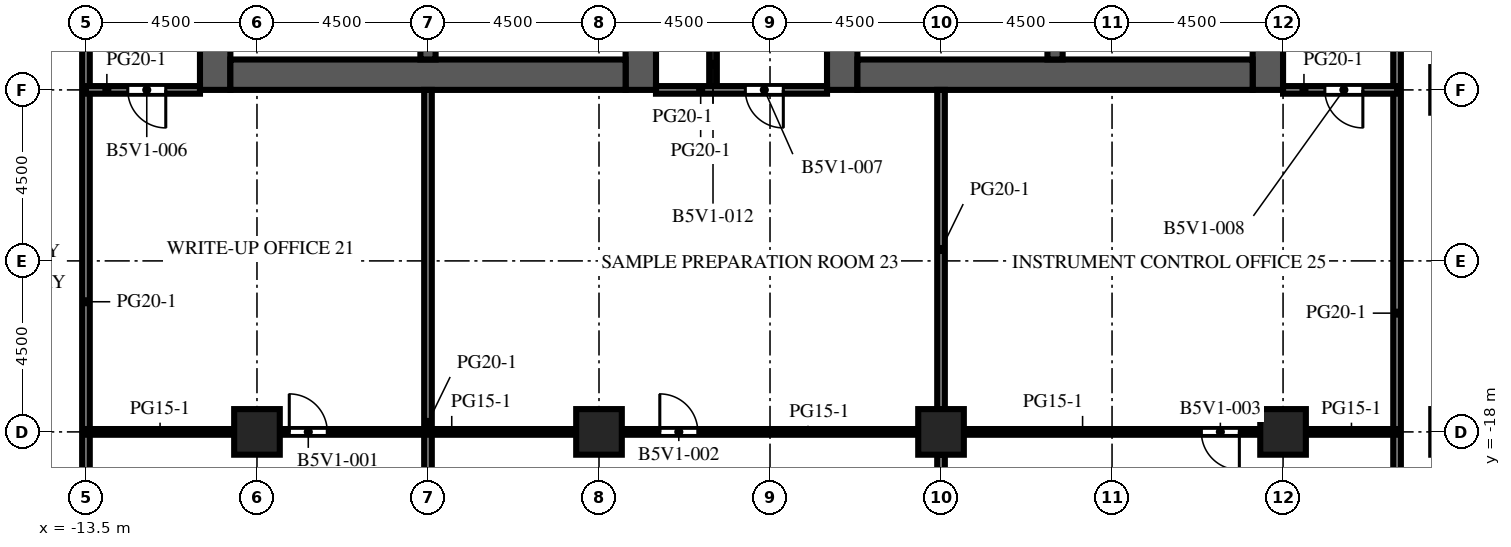
"""IFC4 building model, lengths in metres.
Left out: names, types, materials, properties, quantities, classifications, styles, units other than length and angle.
Written with IfcOpenShell. Run it as: python <this file> out.ifc"""

import sys

from ifc_helpers import new_model, si_unit, direction, frame, frame_2d, origin, origin_2d, place, context, subcontext, project, spatial, rectangle, extrude, element, fill, save


model = new_model("IFC4")
c1 = context("Model", 3, precision=1e-05, world=origin(), true_north=direction((0.0, 1.0)))
c2 = subcontext(c1, "Body", "Model", "MODEL_VIEW")
j1 = project(units=[si_unit("LENGTHUNIT", "METRE"), si_unit("PLANEANGLEUNIT", "RADIAN")], contexts=[c1])
p1 = place(None, origin())
s1 = spatial("IfcSite", under=j1, at=p1, CompositionType="ELEMENT")
p2 = place(p1, origin())
s2 = spatial("IfcBuilding", under=s1, at=p2, CompositionType="ELEMENT")
p3 = place(p2, frame((0.0, 0.0, 165.0)))
s3 = spatial("IfcBuildingStorey", under=s2, at=p3, CompositionType="ELEMENT", Elevation=165.0)
for number, where, z_axis, x_axis in (
    (1, (-9.0, -18.0, 0.0), (0.0, 0.0, 1.0), (1.0, 0.0, 0.0)),
    (2, (0.0, -18.0, 0.0), (0.0, 0.0, 1.0), (1.0, 0.0, 0.0)),
    (3, (9.0, -18.0, 0.0), (0.0, 0.0, 1.0), (1.0, 0.0, 0.0)),
    (4, (18.0, -18.0, 0.0), (0.0, 0.0, 1.0), (1.0, 0.0, 0.0)),
):
    element("IfcColumn", number, at=place(p3, frame(where, z_axis=z_axis, x_axis=x_axis)), inside=s3, PredefinedType="COLUMN", context=c2, shape_type="SweptSolid", body=[
        extrude(rectangle(XDim=1.2, YDim=1.2, at=origin_2d()), origin(), (0.0, 0.0, 1.0), 4.1),
    ])
p4 = place(p3, frame((-10.1, -9.0, 0.0), z_axis=(0.0, 0.0, 1.0), x_axis=(0.0, 1.0, 0.0)))
e5 = element("IfcWall", 5, at=p4, inside=s3, PredefinedType="SHEAR", context=c2, shape_type="SweptSolid", body=[
    extrude(rectangle(XDim=27.5, YDim=0.8, at=frame_2d((13.75, 0.0))), origin(), (0.0, 0.0, 1.0), 4.1),
])
p5 = place(p4, frame((12.55, 0.0, 0.0)))
e6 = element("IfcOpeningElement", 6, at=p5, cuts=e5, PredefinedType="OPENING", context=c2, shape_type="SweptSolid", body=[
    extrude(rectangle(XDim=2.4, YDim=2.4, at=frame_2d((1.2, 1.2))), frame((0.0, 0.41, 0.0), z_axis=(0.0, -1.0, 0.0), x_axis=(1.0, 0.0, 0.0)), (0.0, 0.0, 1.0), 0.82),
])
p6 = place(p4, frame((6.825, 0.0, 0.0)))
e7 = element("IfcOpeningElement", 7, at=p6, cuts=e5, PredefinedType="OPENING", context=c2, shape_type="SweptSolid", body=[
    extrude(rectangle(XDim=1.2, YDim=2.1, at=frame_2d((0.6, 1.05))), frame((0.0, 0.41, 0.0), z_axis=(0.0, -1.0, 0.0), x_axis=(1.0, 0.0, 0.0)), (0.0, 0.0, 1.0), 0.82),
])
p7 = place(p4, frame((19.475, 0.0, 0.0)))
e8 = element("IfcOpeningElement", 8, at=p7, cuts=e5, PredefinedType="OPENING", context=c2, shape_type="SweptSolid", body=[
    extrude(rectangle(XDim=1.2, YDim=2.1, at=frame_2d((0.6, 1.05))), frame((0.0, 0.41, 0.0), z_axis=(0.0, -1.0, 0.0), x_axis=(1.0, 0.0, 0.0)), (0.0, 0.0, 1.0), 0.82),
])
p8 = place(p3, frame((1.1, -9.0, 0.0), z_axis=(0.0, 0.0, 1.0), x_axis=(0.0, 1.0, 0.0)))
e9 = element("IfcWall", 9, at=p8, inside=s3, PredefinedType="SHEAR", context=c2, shape_type="SweptSolid", body=[
    extrude(rectangle(XDim=27.5, YDim=0.8, at=frame_2d((13.75, 0.0))), origin(), (0.0, 0.0, 1.0), 4.1),
])
p9 = place(p8, frame((12.55, 0.0, 0.0)))
e10 = element("IfcOpeningElement", 10, at=p9, cuts=e9, PredefinedType="OPENING", context=c2, shape_type="SweptSolid", body=[
    extrude(rectangle(XDim=2.4, YDim=2.4, at=frame_2d((1.2, 1.2))), frame((0.0, 0.41, 0.0), z_axis=(0.0, -1.0, 0.0), x_axis=(1.0, 0.0, 0.0)), (0.0, 0.0, 1.0), 0.82),
])
p10 = place(p8, frame((3.95, 0.0, 0.0)))
e11 = element("IfcOpeningElement", 11, at=p10, cuts=e9, PredefinedType="OPENING", context=c2, shape_type="SweptSolid", body=[
    extrude(rectangle(XDim=1.2, YDim=2.1, at=frame_2d((0.6, 1.05))), frame((0.0, 0.41, 0.0), z_axis=(0.0, -1.0, 0.0), x_axis=(1.0, 0.0, 0.0)), (0.0, 0.0, 1.0), 0.82),
])
p11 = place(p8, frame((22.35, 0.0, 0.0)))
e12 = element("IfcOpeningElement", 12, at=p11, cuts=e9, PredefinedType="OPENING", context=c2, shape_type="SweptSolid", body=[
    extrude(rectangle(XDim=1.2, YDim=2.1, at=frame_2d((0.6, 1.05))), frame((0.0, 0.41, 0.0), z_axis=(0.0, -1.0, 0.0), x_axis=(1.0, 0.0, 0.0)), (0.0, 0.0, 1.0), 0.82),
])
p12 = place(p3, frame((-9.7, -8.6, 0.0), z_axis=(0.0, 0.0, 1.0), x_axis=(1.0, 0.0, 0.0)))
e13 = element("IfcWall", 13, at=p12, inside=s3, PredefinedType="SHEAR", context=c2, shape_type="SweptSolid", body=[
    extrude(rectangle(XDim=10.4, YDim=0.8, at=frame_2d((5.2, 0.0))), origin(), (0.0, 0.0, 1.0), 4.1),
])
p13 = place(p3, frame((-4.5, -8.2, 0.0), z_axis=(0.0, 0.0, 1.0), x_axis=(0.0, 1.0, 0.0)))
e14 = element("IfcWall", 14, at=p13, inside=s3, PredefinedType="SHEAR", context=c2, shape_type="SweptSolid", body=[
    extrude(rectangle(XDim=7.5, YDim=0.4, at=frame_2d((3.75, 0.0))), origin(), (0.0, 0.0, 1.0), 4.1),
])
p14 = place(p3, frame((6.4, -9.0, 0.0), z_axis=(0.0, 0.0, 1.0), x_axis=(0.0, 1.0, 0.0)))
e15 = element("IfcWall", 15, at=p14, inside=s3, PredefinedType="SHEAR", context=c2, shape_type="SweptSolid", body=[
    extrude(rectangle(XDim=27.5, YDim=0.8, at=frame_2d((13.75, 0.0))), origin(), (0.0, 0.0, 1.0), 4.1),
])
p15 = place(p14, frame((12.55, 0.0, 0.0)))
e16 = element("IfcOpeningElement", 16, at=p15, cuts=e15, PredefinedType="OPENING", context=c2, shape_type="SweptSolid", body=[
    extrude(rectangle(XDim=2.4, YDim=2.4, at=frame_2d((1.2, 1.2))), frame((0.0, 0.41, 0.0), z_axis=(0.0, -1.0, 0.0), x_axis=(1.0, 0.0, 0.0)), (0.0, 0.0, 1.0), 0.82),
])
p16 = place(p14, frame((3.95, 0.0, 0.0)))
e17 = element("IfcOpeningElement", 17, at=p16, cuts=e15, PredefinedType="OPENING", context=c2, shape_type="SweptSolid", body=[
    extrude(rectangle(XDim=1.2, YDim=2.1, at=frame_2d((0.6, 1.05))), frame((0.0, 0.41, 0.0), z_axis=(0.0, -1.0, 0.0), x_axis=(1.0, 0.0, 0.0)), (0.0, 0.0, 1.0), 0.82),
])
p17 = place(p14, frame((22.35, 0.0, 0.0)))
e18 = element("IfcOpeningElement", 18, at=p17, cuts=e15, PredefinedType="OPENING", context=c2, shape_type="SweptSolid", body=[
    extrude(rectangle(XDim=1.2, YDim=2.1, at=frame_2d((0.6, 1.05))), frame((0.0, 0.41, 0.0), z_axis=(0.0, -1.0, 0.0), x_axis=(1.0, 0.0, 0.0)), (0.0, 0.0, 1.0), 0.82),
])
p18 = place(p3, frame((17.6, -9.0, 0.0), z_axis=(0.0, 0.0, 1.0), x_axis=(0.0, 1.0, 0.0)))
e19 = element("IfcWall", 19, at=p18, inside=s3, PredefinedType="SHEAR", context=c2, shape_type="SweptSolid", body=[
    extrude(rectangle(XDim=27.5, YDim=0.8, at=frame_2d((13.75, 0.0))), origin(), (0.0, 0.0, 1.0), 4.1),
])
p19 = place(p18, frame((12.55, 0.0, 0.0)))
e20 = element("IfcOpeningElement", 20, at=p19, cuts=e19, PredefinedType="OPENING", context=c2, shape_type="SweptSolid", body=[
    extrude(rectangle(XDim=2.4, YDim=2.4, at=frame_2d((1.2, 1.2))), frame((0.0, 0.41, 0.0), z_axis=(0.0, -1.0, 0.0), x_axis=(1.0, 0.0, 0.0)), (0.0, 0.0, 1.0), 0.82),
])
p20 = place(p18, frame((6.825, 0.0, 0.0)))
e21 = element("IfcOpeningElement", 21, at=p20, cuts=e19, PredefinedType="OPENING", context=c2, shape_type="SweptSolid", body=[
    extrude(rectangle(XDim=1.2, YDim=2.1, at=frame_2d((0.6, 1.05))), frame((0.0, 0.41, 0.0), z_axis=(0.0, -1.0, 0.0), x_axis=(1.0, 0.0, 0.0)), (0.0, 0.0, 1.0), 0.82),
])
p21 = place(p18, frame((19.475, 0.0, 0.0)))
e22 = element("IfcOpeningElement", 22, at=p21, cuts=e19, PredefinedType="OPENING", context=c2, shape_type="SweptSolid", body=[
    extrude(rectangle(XDim=1.2, YDim=2.1, at=frame_2d((0.6, 1.05))), frame((0.0, 0.41, 0.0), z_axis=(0.0, -1.0, 0.0), x_axis=(1.0, 0.0, 0.0)), (0.0, 0.0, 1.0), 0.82),
])
p22 = place(p3, frame((6.8, -8.6, 0.0), z_axis=(0.0, 0.0, 1.0), x_axis=(1.0, 0.0, 0.0)))
e23 = element("IfcWall", 23, at=p22, inside=s3, PredefinedType="SHEAR", context=c2, shape_type="SweptSolid", body=[
    extrude(rectangle(XDim=10.4, YDim=0.8, at=frame_2d((5.2, 0.0))), origin(), (0.0, 0.0, 1.0), 4.1),
])
p23 = place(p3, frame((12.0, -8.2, 0.0), z_axis=(0.0, 0.0, 1.0), x_axis=(0.0, 1.0, 0.0)))
e24 = element("IfcWall", 24, at=p23, inside=s3, PredefinedType="SHEAR", context=c2, shape_type="SweptSolid", body=[
    extrude(rectangle(XDim=7.5, YDim=0.4, at=frame_2d((3.75, 0.0))), origin(), (0.0, 0.0, 1.0), 4.1),
])
p24 = place(p3, frame((-0.8, -8.2, 0.0), z_axis=(0.0, 0.0, 1.0), x_axis=(0.0, 1.0, 0.0)))
e25 = element("IfcWall", 25, at=p24, inside=s3, PredefinedType="PARTITIONING", context=c2, shape_type="SweptSolid", body=[
    extrude(rectangle(XDim=2.55, YDim=0.1, at=frame_2d((1.275, 0.0))), origin(), (0.0, 0.0, 1.0), 3.65),
])
p25 = place(p24, frame((0.775, 0.0, 0.0)))
e26 = element("IfcOpeningElement", 26, at=p25, cuts=e25, PredefinedType="OPENING", context=c2, shape_type="SweptSolid", body=[
    extrude(rectangle(XDim=1.0, YDim=2.1, at=frame_2d((0.5, 1.05))), frame((0.0, 0.06, 0.0), z_axis=(0.0, -1.0, 0.0), x_axis=(1.0, 0.0, 0.0)), (0.0, 0.0, 1.0), 0.12),
])
p26 = place(p3, frame((8.3, -8.2, 0.0), z_axis=(0.0, 0.0, 1.0), x_axis=(0.0, 1.0, 0.0)))
e27 = element("IfcWall", 27, at=p26, inside=s3, PredefinedType="PARTITIONING", context=c2, shape_type="SweptSolid", body=[
    extrude(rectangle(XDim=2.55, YDim=0.1, at=frame_2d((1.275, 0.0))), origin(), (0.0, 0.0, 1.0), 3.65),
])
p27 = place(p26, frame((0.775, 0.0, 0.0)))
e28 = element("IfcOpeningElement", 28, at=p27, cuts=e27, PredefinedType="OPENING", context=c2, shape_type="SweptSolid", body=[
    extrude(rectangle(XDim=1.0, YDim=2.1, at=frame_2d((0.5, 1.05))), frame((0.0, 0.06, 0.0), z_axis=(0.0, -1.0, 0.0), x_axis=(1.0, 0.0, 0.0)), (0.0, 0.0, 1.0), 0.12),
])
p28 = place(p3, frame((-13.5, -26.5, 0.0), z_axis=(0.0, 0.0, 1.0), x_axis=(0.0, 1.0, 0.0)))
e29 = element("IfcWall", 29, at=p28, inside=s3, PredefinedType="PARTITIONING", context=c2, shape_type="SweptSolid", body=[
    extrude(rectangle(XDim=29.75, YDim=0.2, at=frame_2d((14.875, 0.0))), origin(), (0.0, 0.0, 1.0), 3.65),
])
p29 = place(p28, frame((23.85, 0.0, 0.0)))
e30 = element("IfcOpeningElement", 30, at=p29, cuts=e29, PredefinedType="OPENING", context=c2, shape_type="SweptSolid", body=[
    extrude(rectangle(XDim=1.0, YDim=2.1, at=frame_2d((0.5, 1.05))), frame((0.0, 0.11, 0.0), z_axis=(0.0, -1.0, 0.0), x_axis=(1.0, 0.0, 0.0)), (0.0, 0.0, 1.0), 0.22),
])
p30 = place(p3, frame((-4.5, -26.5, 0.0), z_axis=(0.0, 0.0, 1.0), x_axis=(0.0, 1.0, 0.0)))
e31 = element("IfcWall", 31, at=p30, inside=s3, PredefinedType="PARTITIONING", context=c2, shape_type="SweptSolid", body=[
    extrude(rectangle(XDim=17.5, YDim=0.2, at=frame_2d((8.75, 0.0))), origin(), (0.0, 0.0, 1.0), 3.65),
])
p31 = place(p3, frame((3.0, -9.0, 0.0), z_axis=(0.0, 0.0, 1.0), x_axis=(0.0, 1.0, 0.0)))
e32 = element("IfcWall", 32, at=p31, inside=s3, PredefinedType="PARTITIONING", context=c2, shape_type="SweptSolid", body=[
    extrude(rectangle(XDim=3.0, YDim=0.2, at=frame_2d((1.5, 0.0))), origin(), (0.0, 0.0, 1.0), 3.65),
])
p32 = place(p31, frame((1.35, 0.0, 0.0)))
e33 = element("IfcOpeningElement", 33, at=p32, cuts=e32, PredefinedType="OPENING", context=c2, shape_type="SweptSolid", body=[
    extrude(rectangle(XDim=1.0, YDim=2.1, at=frame_2d((0.5, 1.05))), frame((0.0, 0.11, 0.0), z_axis=(0.0, -1.0, 0.0), x_axis=(1.0, 0.0, 0.0)), (0.0, 0.0, 1.0), 0.22),
])
p33 = place(p3, frame((9.0, -26.5, 0.0), z_axis=(0.0, 0.0, 1.0), x_axis=(0.0, 1.0, 0.0)))
e34 = element("IfcWall", 34, at=p33, inside=s3, PredefinedType="PARTITIONING", context=c2, shape_type="SweptSolid", body=[
    extrude(rectangle(XDim=7.9, YDim=0.2, at=frame_2d((3.95, 0.0))), origin(), (0.0, 0.0, 1.0), 3.65),
])
p34 = place(p3, frame((9.0, -17.4, 0.0), z_axis=(0.0, 0.0, 1.0), x_axis=(0.0, 1.0, 0.0)))
e35 = element("IfcWall", 35, at=p34, inside=s3, PredefinedType="PARTITIONING", context=c2, shape_type="SweptSolid", body=[
    extrude(rectangle(XDim=8.4, YDim=0.2, at=frame_2d((4.2, 0.0))), origin(), (0.0, 0.0, 1.0), 3.65),
])
p35 = place(p3, frame((21.0, 3.25, 0.0), z_axis=(0.0, 0.0, 1.0), x_axis=(0.0, -1.0, 0.0)))
e36 = element("IfcWall", 36, at=p35, inside=s3, PredefinedType="PARTITIONING", context=c2, shape_type="SweptSolid", body=[
    extrude(rectangle(XDim=30.1, YDim=0.2, at=frame_2d((15.05, 0.0))), origin(), (0.0, 0.0, 1.0), 3.65),
])
p36 = place(p35, frame((5.15, 0.0, 0.0)))
e37 = element("IfcOpeningElement", 37, at=p36, cuts=e36, PredefinedType="OPENING", context=c2, shape_type="SweptSolid", body=[
    extrude(rectangle(XDim=1.0, YDim=2.1, at=frame_2d((0.5, 1.05))), frame((0.0, 0.11, 0.0), z_axis=(0.0, -1.0, 0.0), x_axis=(1.0, 0.0, 0.0)), (0.0, 0.0, 1.0), 0.22),
])
p37 = place(p3, frame((-13.5, -18.0, 0.0), z_axis=(0.0, 0.0, 1.0), x_axis=(1.0, 0.0, 0.0)))
e38 = element("IfcWall", 38, at=p37, inside=s3, PredefinedType="PARTITIONING", context=c2, shape_type="SweptSolid", body=[
    extrude(rectangle(XDim=3.9, YDim=0.15, at=frame_2d((1.95, 0.0))), origin(), (0.0, 0.0, 1.0), 3.65),
])
p38 = place(p3, frame((-0.6, -18.0, 0.0), z_axis=(0.0, 0.0, 1.0), x_axis=(-1.0, 0.0, 0.0)))
e39 = element("IfcWall", 39, at=p38, inside=s3, PredefinedType="PARTITIONING", context=c2, shape_type="SweptSolid", body=[
    extrude(rectangle(XDim=7.8, YDim=0.15, at=frame_2d((3.9, 0.0))), origin(), (0.0, 0.0, 1.0), 3.65),
])
p39 = place(p38, frame((6.55, 0.0, 0.0)))
e40 = element("IfcOpeningElement", 40, at=p39, cuts=e39, PredefinedType="OPENING", context=c2, shape_type="SweptSolid", body=[
    extrude(rectangle(XDim=1.0, YDim=2.1, at=frame_2d((0.5, 1.05))), frame((0.0, 0.085, 0.0), z_axis=(0.0, -1.0, 0.0), x_axis=(1.0, 0.0, 0.0)), (0.0, 0.0, 1.0), 0.17),
])
p40 = place(p3, frame((8.4, -18.0, 0.0), z_axis=(0.0, 0.0, 1.0), x_axis=(-1.0, 0.0, 0.0)))
e41 = element("IfcWall", 41, at=p40, inside=s3, PredefinedType="PARTITIONING", context=c2, shape_type="SweptSolid", body=[
    extrude(rectangle(XDim=7.8, YDim=0.15, at=frame_2d((3.9, 0.0))), origin(), (0.0, 0.0, 1.0), 3.65),
])
p41 = place(p40, frame((5.8, 0.0, 0.0)))
e42 = element("IfcOpeningElement", 42, at=p41, cuts=e41, PredefinedType="OPENING", context=c2, shape_type="SweptSolid", body=[
    extrude(rectangle(XDim=1.0, YDim=2.1, at=frame_2d((0.5, 1.05))), frame((0.0, 0.085, 0.0), z_axis=(0.0, -1.0, 0.0), x_axis=(1.0, 0.0, 0.0)), (0.0, 0.0, 1.0), 0.17),
])
p42 = place(p3, frame((17.4, -18.0, 0.0), z_axis=(0.0, 0.0, 1.0), x_axis=(-1.0, 0.0, 0.0)))
e43 = element("IfcWall", 43, at=p42, inside=s3, PredefinedType="PARTITIONING", context=c2, shape_type="SweptSolid", body=[
    extrude(rectangle(XDim=7.8, YDim=0.15, at=frame_2d((3.9, 0.0))), origin(), (0.0, 0.0, 1.0), 3.65),
])
p43 = place(p42, frame((0.55, 0.0, 0.0)))
e44 = element("IfcOpeningElement", 44, at=p43, cuts=e43, PredefinedType="OPENING", context=c2, shape_type="SweptSolid", body=[
    extrude(rectangle(XDim=1.0, YDim=2.1, at=frame_2d((0.5, 1.05))), frame((0.0, 0.085, 0.0), z_axis=(0.0, -1.0, 0.0), x_axis=(1.0, 0.0, 0.0)), (0.0, 0.0, 1.0), 0.17),
])
p44 = place(p3, frame((18.6, -18.0, 0.0), z_axis=(0.0, 0.0, 1.0), x_axis=(1.0, 0.0, 0.0)))
e45 = element("IfcWall", 45, at=p44, inside=s3, PredefinedType="PARTITIONING", context=c2, shape_type="SweptSolid", body=[
    extrude(rectangle(XDim=2.4, YDim=0.15, at=frame_2d((1.2, 0.0))), origin(), (0.0, 0.0, 1.0), 3.65),
])
p45 = place(p3, frame((-10.5, -9.0, 0.0), z_axis=(0.0, 0.0, 1.0), x_axis=(-1.0, 0.0, 0.0)))
e46 = element("IfcWall", 46, at=p45, inside=s3, PredefinedType="PARTITIONING", context=c2, shape_type="SweptSolid", body=[
    extrude(rectangle(XDim=3.0, YDim=0.2, at=frame_2d((1.5, 0.0))), origin(), (0.0, 0.0, 1.0), 3.65),
])
p46 = place(p45, frame((0.9, 0.0, 0.0)))
e47 = element("IfcOpeningElement", 47, at=p46, cuts=e46, PredefinedType="OPENING", context=c2, shape_type="SweptSolid", body=[
    extrude(rectangle(XDim=1.0, YDim=2.1, at=frame_2d((0.5, 1.05))), frame((0.0, 0.11, 0.0), z_axis=(0.0, -1.0, 0.0), x_axis=(1.0, 0.0, 0.0)), (0.0, 0.0, 1.0), 0.22),
])
p47 = place(p3, frame((6.0, -9.0, 0.0), z_axis=(0.0, 0.0, 1.0), x_axis=(-1.0, 0.0, 0.0)))
e48 = element("IfcWall", 48, at=p47, inside=s3, PredefinedType="PARTITIONING", context=c2, shape_type="SweptSolid", body=[
    extrude(rectangle(XDim=4.5, YDim=0.2, at=frame_2d((2.25, 0.0))), origin(), (0.0, 0.0, 1.0), 3.65),
])
p48 = place(p47, frame((1.15, 0.0, 0.0)))
e49 = element("IfcOpeningElement", 49, at=p48, cuts=e48, PredefinedType="OPENING", context=c2, shape_type="SweptSolid", body=[
    extrude(rectangle(XDim=1.0, YDim=2.1, at=frame_2d((0.5, 1.05))), frame((0.0, 0.11, 0.0), z_axis=(0.0, -1.0, 0.0), x_axis=(1.0, 0.0, 0.0)), (0.0, 0.0, 1.0), 0.22),
])
p49 = place(p3, frame((21.0, -9.0, 0.0), z_axis=(0.0, 0.0, 1.0), x_axis=(-1.0, 0.0, 0.0)))
e50 = element("IfcWall", 50, at=p49, inside=s3, PredefinedType="PARTITIONING", context=c2, shape_type="SweptSolid", body=[
    extrude(rectangle(XDim=3.0, YDim=0.2, at=frame_2d((1.5, 0.0))), origin(), (0.0, 0.0, 1.0), 3.65),
])
p50 = place(p49, frame((0.9, 0.0, 0.0)))
e51 = element("IfcOpeningElement", 51, at=p50, cuts=e50, PredefinedType="OPENING", context=c2, shape_type="SweptSolid", body=[
    extrude(rectangle(XDim=1.0, YDim=2.1, at=frame_2d((0.5, 1.05))), frame((0.0, 0.11, 0.0), z_axis=(0.0, -1.0, 0.0), x_axis=(1.0, 0.0, 0.0)), (0.0, 0.0, 1.0), 0.22),
])
p51 = place(p39, origin())
e52 = element("IfcDoor", 52, at=p51, inside=s3, OperationType="SINGLE_SWING_RIGHT", PredefinedType="DOOR", context=c2, shape_type="SweptSolid", body=[
    extrude(rectangle(XDim=1.0, YDim=2.1, at=frame_2d((0.5, 1.05))), frame((0.0, 0.025, 0.0), z_axis=(0.0, -1.0, 0.0), x_axis=(1.0, 0.0, 0.0)), (0.0, 0.0, 1.0), 0.05),
])
fill(e40, e52)
p52 = place(p41, origin())
e53 = element("IfcDoor", 53, at=p52, inside=s3, OperationType="SINGLE_SWING_RIGHT", PredefinedType="DOOR", context=c2, shape_type="SweptSolid", body=[
    extrude(rectangle(XDim=1.0, YDim=2.1, at=frame_2d((0.5, 1.05))), frame((0.0, 0.025, 0.0), z_axis=(0.0, -1.0, 0.0), x_axis=(1.0, 0.0, 0.0)), (0.0, 0.0, 1.0), 0.05),
])
fill(e42, e53)
p53 = place(p43, origin())
e54 = element("IfcDoor", 54, at=p53, inside=s3, OperationType="SINGLE_SWING_LEFT", PredefinedType="DOOR", context=c2, shape_type="SweptSolid", body=[
    extrude(rectangle(XDim=1.0, YDim=2.1, at=frame_2d((0.5, 1.05))), frame((0.0, 0.025, 0.0), z_axis=(0.0, -1.0, 0.0), x_axis=(1.0, 0.0, 0.0)), (0.0, 0.0, 1.0), 0.05),
])
fill(e44, e54)
p54 = place(p46, origin())
e55 = element("IfcDoor", 55, at=p54, inside=s3, OperationType="SINGLE_SWING_LEFT", PredefinedType="DOOR", context=c2, shape_type="SweptSolid", body=[
    extrude(rectangle(XDim=1.0, YDim=2.1, at=frame_2d((0.5, 1.05))), frame((0.0, 0.025, 0.0), z_axis=(0.0, -1.0, 0.0), x_axis=(1.0, 0.0, 0.0)), (0.0, 0.0, 1.0), 0.05),
])
fill(e47, e55)
p55 = place(p48, origin())
e56 = element("IfcDoor", 56, at=p55, inside=s3, OperationType="SINGLE_SWING_LEFT", PredefinedType="DOOR", context=c2, shape_type="SweptSolid", body=[
    extrude(rectangle(XDim=1.0, YDim=2.1, at=frame_2d((0.5, 1.05))), frame((0.0, 0.025, 0.0), z_axis=(0.0, -1.0, 0.0), x_axis=(1.0, 0.0, 0.0)), (0.0, 0.0, 1.0), 0.05),
])
fill(e49, e56)
p56 = place(p50, origin())
e57 = element("IfcDoor", 57, at=p56, inside=s3, OperationType="SINGLE_SWING_LEFT", PredefinedType="DOOR", context=c2, shape_type="SweptSolid", body=[
    extrude(rectangle(XDim=1.0, YDim=2.1, at=frame_2d((0.5, 1.05))), frame((0.0, 0.025, 0.0), z_axis=(0.0, -1.0, 0.0), x_axis=(1.0, 0.0, 0.0)), (0.0, 0.0, 1.0), 0.05),
])
fill(e51, e57)
save(model, sys.argv[1])
